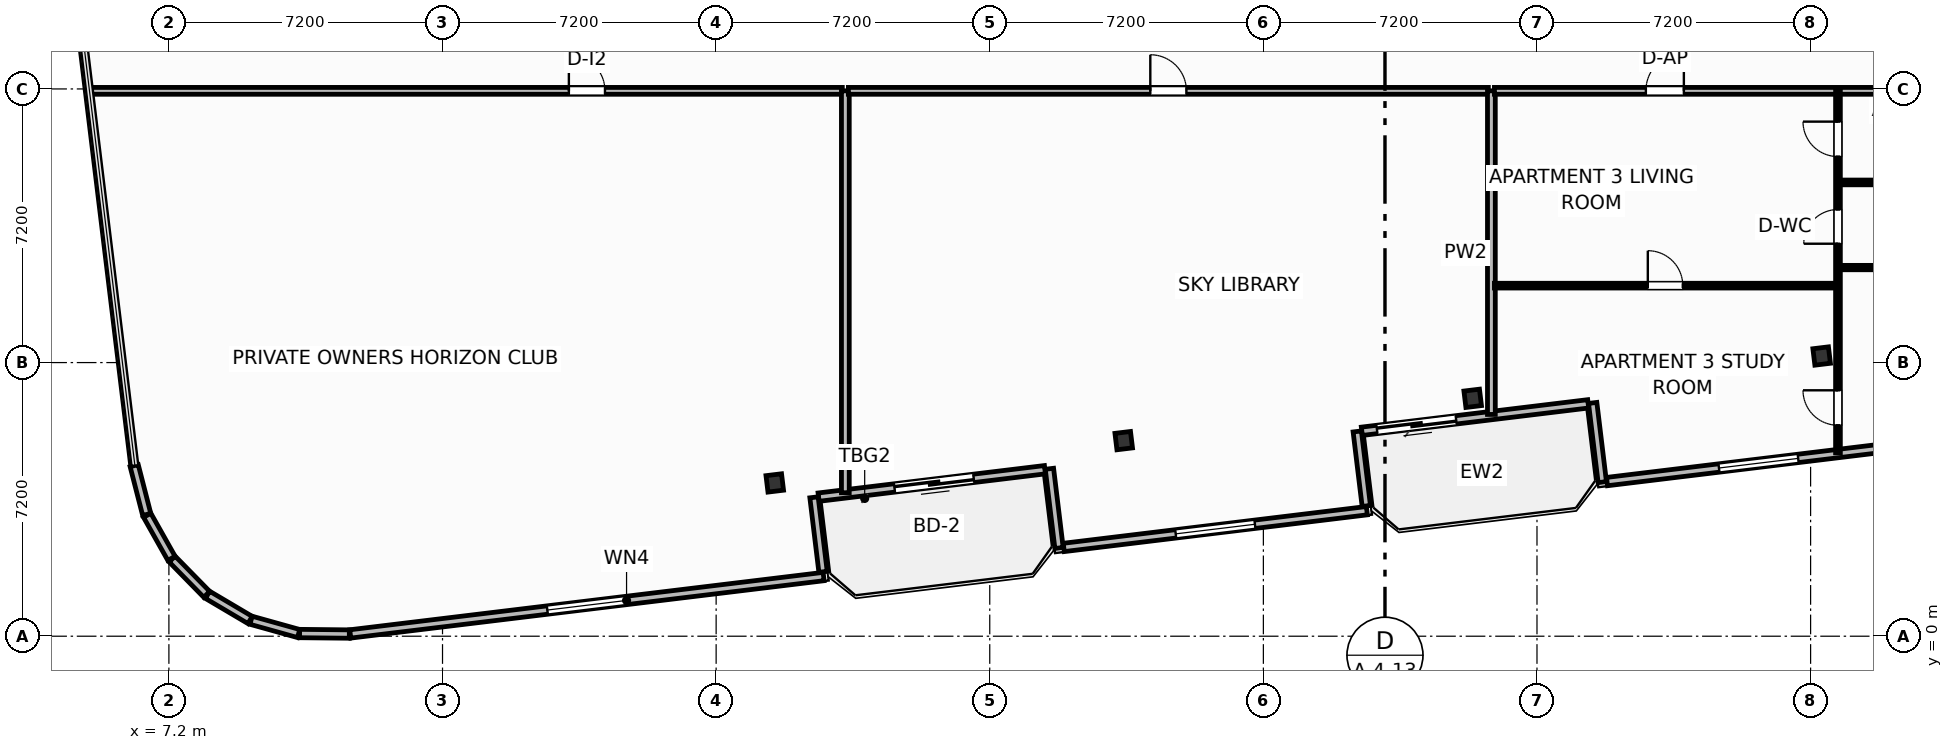
"""IFC4 building model, lengths in metres.
Left out: names, types, materials, properties, quantities, classifications, styles, units other than length and angle.
Written with IfcOpenShell. Run it as: python <this file> out.ifc"""

import sys

from ifc_helpers import new_model, si_unit, direction, frame, frame_2d, origin, origin_2d, place, context, subcontext, project, spatial, rectangle, i_section, extrude, element, fill, save


model = new_model("IFC4")
c1 = context("Model", 3, precision=1e-05, world=origin(), true_north=direction((0.0, 1.0)))
c2 = subcontext(c1, "Body", "Model", "MODEL_VIEW")
j1 = project(units=[si_unit("LENGTHUNIT", "METRE"), si_unit("PLANEANGLEUNIT", "RADIAN")], contexts=[c1])
p1 = place(None, origin())
s1 = spatial("IfcSite", under=j1, at=p1, CompositionType="ELEMENT")
p2 = place(p1, origin())
s2 = spatial("IfcBuilding", under=s1, at=p2, CompositionType="ELEMENT")
p3 = place(p2, frame((0.0, 0.0, 178.3)))
s3 = spatial("IfcBuildingStorey", under=s2, at=p3, CompositionType="ELEMENT", Elevation=178.3)
for number, where, z_axis, x_axis in (
    (1, (23.143, 4.033, 0.0), (0.0, 0.0, 1.0), (0.993, 0.12, 0.0)),
    (2, (32.325, 5.146, 0.0), (0.0, 0.0, 1.0), (0.993, 0.12, 0.0)),
    (3, (41.508, 6.26, 0.0), (0.0, 0.0, 1.0), (0.993, 0.12, 0.0)),
    (4, (50.691, 7.373, 0.0), (0.0, 0.0, 1.0), (0.993, 0.12, 0.0)),
):
    element("IfcColumn", number, at=place(p3, frame(where, z_axis=z_axis, x_axis=x_axis)), inside=s3, PredefinedType="COLUMN", context=c2, shape_type="SweptSolid", body=[
        extrude(i_section(OverallWidth=0.412, OverallDepth=0.435, WebThickness=0.036, FlangeThickness=0.057, FilletRadius=0.025, at=origin_2d()), origin(), (0.0, 0.0, 1.0), 3.7),
    ])
p4 = place(p3, frame((30.252, 4.381, 0.0), z_axis=(0.0, 0.0, 1.0), x_axis=(-0.992735402148, -0.120318000826, 0.0)))
e5 = element("IfcWall", 5, at=p4, inside=s3, PredefinedType="SOLIDWALL", context=c2, shape_type="SweptSolid", body=[
    extrude(rectangle(XDim=6.0, YDim=0.22, at=frame_2d((3.0, 0.0))), origin(), (0.0, 0.0, 1.0), 2.73),
])
p5 = place(p4, frame((1.888, 0.0, 0.0)))
e6 = element("IfcOpeningElement", 6, at=p5, cuts=e5, PredefinedType="OPENING", context=c2, shape_type="SweptSolid", body=[
    extrude(rectangle(XDim=2.1, YDim=2.3, at=frame_2d((1.05, 1.15))), frame((0.0, 0.12, 0.0), z_axis=(0.0, -1.0, 0.0), x_axis=(1.0, 0.0, 0.0)), (0.0, 0.0, 1.0), 0.24),
])
p6 = place(p3, frame((44.548, 6.114, 0.0), z_axis=(0.0, 0.0, 1.0), x_axis=(-0.992735402148, -0.120318000826, 0.0)))
e7 = element("IfcWall", 7, at=p6, inside=s3, PredefinedType="SOLIDWALL", context=c2, shape_type="SweptSolid", body=[
    extrude(rectangle(XDim=6.0, YDim=0.22, at=frame_2d((3.0, 0.0))), origin(), (0.0, 0.0, 1.0), 2.73),
])
p7 = place(p6, frame((3.5, 0.0, 0.0)))
e8 = element("IfcOpeningElement", 8, at=p7, cuts=e7, PredefinedType="OPENING", context=c2, shape_type="SweptSolid", body=[
    extrude(rectangle(XDim=2.1, YDim=2.3, at=frame_2d((1.05, 1.15))), frame((0.0, 0.12, 0.0), z_axis=(0.0, -1.0, 0.0), x_axis=(1.0, 0.0, 0.0)), (0.0, 0.0, 1.0), 0.24),
])
p8 = place(p3, frame((6.286, 4.488, 0.0), z_axis=(0.0, 0.0, 1.0), x_axis=(0.248942347653, -0.968518305219, 0.0)))
e9 = element("IfcWall", 9, at=p8, inside=s3, PredefinedType="SOLIDWALL", context=c2, shape_type="SweptSolid", body=[
    extrude(rectangle(XDim=1.326, YDim=0.22, at=frame_2d((0.663, 0.0))), origin(), (0.0, 0.0, 1.0), 2.73),
])
for number, where, z_axis, x_axis in (
    (10, (6.629, 3.182, 0.0), (0.0, 0.0, 1.0), (0.491, -0.871, 0.0)),
    (11, (7.285, 2.031, 0.0), (0.0, 0.0, 1.0), (0.7, -0.714, 0.0)),
    (12, (8.217, 1.089, 0.0), (0.0, 0.0, 1.0), (0.861, -0.509, 0.0)),
):
    element("IfcWall", number, at=place(p3, frame(where, z_axis=z_axis, x_axis=x_axis)), inside=s3, PredefinedType="SOLIDWALL", context=c2, shape_type="SweptSolid", body=[
        extrude(rectangle(XDim=1.301, YDim=0.22, at=frame_2d((0.65, 0.0))), origin(), (0.0, 0.0, 1.0), 2.73),
    ])
p9 = place(p3, frame((9.361, 0.42, 0.0), z_axis=(0.0, 0.0, 1.0), x_axis=(0.963218895288, -0.268717992997, 0.0)))
e13 = element("IfcWall", 13, at=p9, inside=s3, PredefinedType="SOLIDWALL", context=c2, shape_type="SweptSolid", body=[
    extrude(rectangle(XDim=1.301, YDim=0.22, at=frame_2d((0.65, 0.0))), origin(), (0.0, 0.0, 1.0), 2.73),
])
p10 = place(p3, frame((10.639, 0.07, 0.0), z_axis=(0.0, 0.0, 1.0), x_axis=(0.999947377741, -0.010258740119, 0.0)))
e14 = element("IfcWall", 14, at=p10, inside=s3, PredefinedType="SOLIDWALL", context=c2, shape_type="SweptSolid", body=[
    extrude(rectangle(XDim=1.309, YDim=0.22, at=frame_2d((0.654, 0.0))), origin(), (0.0, 0.0, 1.0), 2.73),
])
p11 = place(p3, frame((11.972, 0.06, 0.0), z_axis=(0.0, 0.0, 1.0), x_axis=(0.992732021049, 0.120345894751, 0.0)))
e15 = element("IfcWall", 15, at=p11, inside=s3, PredefinedType="SOLIDWALL", context=c2, shape_type="SweptSolid", body=[
    extrude(rectangle(XDim=12.547, YDim=0.22, at=frame_2d((6.274, 0.0))), origin(), (0.0, 0.0, 1.0), 2.73),
])
p12 = place(p11, frame((5.224, 0.0, 0.8)))
e16 = element("IfcOpeningElement", 16, at=p12, cuts=e15, PredefinedType="OPENING", context=c2, shape_type="SweptSolid", body=[
    extrude(rectangle(XDim=2.1, YDim=1.75, at=frame_2d((1.05, 0.875))), frame((0.0, 0.12, 0.0), z_axis=(0.0, -1.0, 0.0), x_axis=(1.0, 0.0, 0.0)), (0.0, 0.0, 1.0), 0.24),
])
p13 = place(p3, frame((24.413, 1.694, 0.0), z_axis=(0.0, 0.0, 1.0), x_axis=(-0.120290754542, 0.992738703976, 0.0)))
e17 = element("IfcWall", 17, at=p13, inside=s3, PredefinedType="SOLIDWALL", context=c2, shape_type="SweptSolid", body=[
    extrude(rectangle(XDim=1.975, YDim=0.22, at=frame_2d((0.987, 0.0))), origin(), (0.0, 0.0, 1.0), 2.73),
])
p14 = place(p3, frame((30.37, 4.406, 0.0), z_axis=(0.0, 0.0, 1.0), x_axis=(0.120327895535, -0.992734202874, 0.0)))
e18 = element("IfcWall", 18, at=p14, inside=s3, PredefinedType="SOLIDWALL", context=c2, shape_type="SweptSolid", body=[
    extrude(rectangle(XDim=2.1, YDim=0.22, at=frame_2d((1.05, 0.0))), origin(), (0.0, 0.0, 1.0), 2.73),
])
p15 = place(p3, frame((30.747, 2.336, 0.0), z_axis=(0.0, 0.0, 1.0), x_axis=(0.992731032022, 0.120354052946, 0.0)))
e19 = element("IfcWall", 19, at=p15, inside=s3, PredefinedType="SOLIDWALL", context=c2, shape_type="SweptSolid", body=[
    extrude(rectangle(XDim=8.035, YDim=0.22, at=frame_2d((4.018, 0.0))), origin(), (0.0, 0.0, 1.0), 2.73),
])
p16 = place(p15, frame((2.968, 0.0, 0.8)))
e20 = element("IfcOpeningElement", 20, at=p16, cuts=e19, PredefinedType="OPENING", context=c2, shape_type="SweptSolid", body=[
    extrude(rectangle(XDim=2.1, YDim=1.75, at=frame_2d((1.05, 0.875))), frame((0.0, 0.12, 0.0), z_axis=(0.0, -1.0, 0.0), x_axis=(1.0, 0.0, 0.0)), (0.0, 0.0, 1.0), 0.24),
])
p17 = place(p3, frame((38.709, 3.427, 0.0), z_axis=(0.0, 0.0, 1.0), x_axis=(-0.120397815541, 0.992725725472, 0.0)))
e21 = element("IfcWall", 21, at=p17, inside=s3, PredefinedType="SOLIDWALL", context=c2, shape_type="SweptSolid", body=[
    extrude(rectangle(XDim=1.975, YDim=0.22, at=frame_2d((0.988, 0.0))), origin(), (0.0, 0.0, 1.0), 2.73),
])
p18 = place(p3, frame((44.666, 6.138, 0.0), z_axis=(0.0, 0.0, 1.0), x_axis=(0.120327895535, -0.992734202874, 0.0)))
e22 = element("IfcWall", 22, at=p18, inside=s3, PredefinedType="SOLIDWALL", context=c2, shape_type="SweptSolid", body=[
    extrude(rectangle(XDim=2.1, YDim=0.22, at=frame_2d((1.05, 0.0))), origin(), (0.0, 0.0, 1.0), 2.73),
])
p19 = place(p3, frame((45.042, 4.069, 0.0), z_axis=(0.0, 0.0, 1.0), x_axis=(0.992731032022, 0.120354052946, 0.0)))
e23 = element("IfcWall", 23, at=p19, inside=s3, PredefinedType="SOLIDWALL", context=c2, shape_type="SweptSolid", body=[
    extrude(rectangle(XDim=8.035, YDim=0.22, at=frame_2d((4.018, 0.0))), origin(), (0.0, 0.0, 1.0), 2.73),
])
p20 = place(p19, frame((2.968, 0.0, 0.8)))
e24 = element("IfcOpeningElement", 24, at=p20, cuts=e23, PredefinedType="OPENING", context=c2, shape_type="SweptSolid", body=[
    extrude(rectangle(XDim=2.1, YDim=1.75, at=frame_2d((1.05, 0.875))), frame((0.0, 0.12, 0.0), z_axis=(0.0, -1.0, 0.0), x_axis=(1.0, 0.0, 0.0)), (0.0, 0.0, 1.0), 0.24),
])
p21 = place(p3, frame((5.15, 14.35, 0.0), z_axis=(0.0, 0.0, 1.0), x_axis=(1.0, 0.0, 0.0)))
e25 = element("IfcWall", 25, at=p21, inside=s3, PredefinedType="PARTITIONING", context=c2, shape_type="SweptSolid", body=[
    extrude(rectangle(XDim=19.77, YDim=0.18, at=frame_2d((9.885, 0.0))), origin(), (0.0, 0.0, 1.0), 3.45),
])
p22 = place(p21, frame((12.575, 0.0, 0.0)))
e26 = element("IfcOpeningElement", 26, at=p22, cuts=e25, PredefinedType="OPENING", context=c2, shape_type="SweptSolid", body=[
    extrude(rectangle(XDim=0.95, YDim=2.05, at=frame_2d((0.475, 1.025))), frame((0.0, 0.1, 0.0), z_axis=(0.0, -1.0, 0.0), x_axis=(1.0, 0.0, 0.0)), (0.0, 0.0, 1.0), 0.2),
])
p23 = place(p3, frame((25.0, 3.775, 0.0), z_axis=(0.0, 0.0, 1.0), x_axis=(0.0, 1.0, 0.0)))
e27 = element("IfcWall", 27, at=p23, inside=s3, PredefinedType="PARTITIONING", context=c2, shape_type="SweptSolid", body=[
    extrude(rectangle(XDim=10.575, YDim=0.205, at=frame_2d((5.288, 0.0))), origin(), (0.0, 0.0, 1.0), 3.45),
])
p24 = place(p3, frame((25.08, 14.35, 0.0), z_axis=(0.0, 0.0, 1.0), x_axis=(1.0, 0.0, 0.0)))
e28 = element("IfcWall", 28, at=p24, inside=s3, PredefinedType="PARTITIONING", context=c2, shape_type="SweptSolid", body=[
    extrude(rectangle(XDim=16.84, YDim=0.18, at=frame_2d((8.42, 0.0))), origin(), (0.0, 0.0, 1.0), 3.45),
])
p25 = place(p24, frame((7.945, 0.0, 0.0)))
e29 = element("IfcOpeningElement", 29, at=p25, cuts=e28, PredefinedType="OPENING", context=c2, shape_type="SweptSolid", body=[
    extrude(rectangle(XDim=0.95, YDim=2.05, at=frame_2d((0.475, 1.025))), frame((0.0, 0.1, 0.0), z_axis=(0.0, -1.0, 0.0), x_axis=(1.0, 0.0, 0.0)), (0.0, 0.0, 1.0), 0.2),
])
p26 = place(p3, frame((42.0, 5.835, 0.0), z_axis=(0.0, 0.0, 1.0), x_axis=(0.0, 1.0, 0.0)))
e30 = element("IfcWall", 30, at=p26, inside=s3, PredefinedType="PARTITIONING", context=c2, shape_type="SweptSolid", body=[
    extrude(rectangle(XDim=8.515, YDim=0.205, at=frame_2d((4.257, 0.0))), origin(), (0.0, 0.0, 1.0), 2.662),
])
p27 = place(p3, frame((42.08, 9.224, 0.0), z_axis=(0.0, 0.0, 1.0), x_axis=(1.0, 0.0, 0.0)))
e31 = element("IfcWall", 31, at=p27, inside=s3, PredefinedType="PARTITIONING", context=c2, shape_type="SweptSolid", body=[
    extrude(rectangle(XDim=8.97, YDim=0.125, at=frame_2d((4.485, 0.0))), origin(), (0.0, 0.0, 1.0), 3.45),
])
p28 = place(p27, frame((4.037, 0.0, 0.0)))
e32 = element("IfcOpeningElement", 32, at=p28, cuts=e31, PredefinedType="OPENING", context=c2, shape_type="SweptSolid", body=[
    extrude(rectangle(XDim=0.92, YDim=2.05, at=frame_2d((0.46, 1.025))), frame((0.0, 0.073, 0.0), z_axis=(0.0, -1.0, 0.0), x_axis=(1.0, 0.0, 0.0)), (0.0, 0.0, 1.0), 0.145),
])
p29 = place(p3, frame((42.08, 14.35, 0.0), z_axis=(0.0, 0.0, 1.0), x_axis=(1.0, 0.0, 0.0)))
e33 = element("IfcWall", 33, at=p29, inside=s3, PredefinedType="PARTITIONING", context=c2, shape_type="SweptSolid", body=[
    extrude(rectangle(XDim=13.84, YDim=0.18, at=frame_2d((6.92, 0.0))), origin(), (0.0, 0.0, 1.0), 3.45),
])
p30 = place(p29, frame((3.985, 0.0, 0.0)))
e34 = element("IfcOpeningElement", 34, at=p30, cuts=e33, PredefinedType="OPENING", context=c2, shape_type="SweptSolid", body=[
    extrude(rectangle(XDim=1.0, YDim=2.2, at=frame_2d((0.5, 1.1))), frame((0.0, 0.1, 0.0), z_axis=(0.0, -1.0, 0.0), x_axis=(1.0, 0.0, 0.0)), (0.0, 0.0, 1.0), 0.2),
])
p31 = place(p3, frame((51.12, 4.826, 0.0), z_axis=(0.0, 0.0, 1.0), x_axis=(0.0, 1.0, 0.0)))
e35 = element("IfcWall", 35, at=p31, inside=s3, PredefinedType="PARTITIONING", context=c2, shape_type="SweptSolid", body=[
    extrude(rectangle(XDim=9.524, YDim=0.125, at=frame_2d((4.762, 0.0))), origin(), (0.0, 0.0, 1.0), 2.662),
])
p32 = place(p31, frame((0.725, 0.0, 0.0)))
e36 = element("IfcOpeningElement", 36, at=p32, cuts=e35, PredefinedType="OPENING", context=c2, shape_type="SweptSolid", body=[
    extrude(rectangle(XDim=0.92, YDim=2.05, at=frame_2d((0.46, 1.025))), frame((0.0, 0.073, 0.0), z_axis=(0.0, -1.0, 0.0), x_axis=(1.0, 0.0, 0.0)), (0.0, 0.0, 1.0), 0.145),
])
p33 = place(p31, frame((5.502, 0.0, 0.0)))
e37 = element("IfcOpeningElement", 37, at=p33, cuts=e35, PredefinedType="OPENING", context=c2, shape_type="SweptSolid", body=[
    extrude(rectangle(XDim=0.9, YDim=2.05, at=frame_2d((0.45, 1.025))), frame((0.0, 0.073, 0.0), z_axis=(0.0, -1.0, 0.0), x_axis=(1.0, 0.0, 0.0)), (0.0, 0.0, 1.0), 0.145),
])
p34 = place(p31, frame((7.794, 0.0, 0.0)))
e38 = element("IfcOpeningElement", 38, at=p34, cuts=e35, PredefinedType="OPENING", context=c2, shape_type="SweptSolid", body=[
    extrude(rectangle(XDim=0.92, YDim=2.05, at=frame_2d((0.46, 1.025))), frame((0.0, 0.073, 0.0), z_axis=(0.0, -1.0, 0.0), x_axis=(1.0, 0.0, 0.0)), (0.0, 0.0, 1.0), 0.145),
])
p35 = place(p3, frame((51.19, 11.94, 0.0), z_axis=(0.0, 0.0, 1.0), x_axis=(1.0, 0.0, 0.0)))
e39 = element("IfcWall", 39, at=p35, inside=s3, PredefinedType="PARTITIONING", context=c2, shape_type="SweptSolid", body=[
    extrude(rectangle(XDim=4.73, YDim=0.125, at=frame_2d((2.365, 0.0))), origin(), (0.0, 0.0, 1.0), 3.018),
])
p36 = place(p3, frame((51.19, 9.7, 0.0), z_axis=(0.0, 0.0, 1.0), x_axis=(1.0, 0.0, 0.0)))
e40 = element("IfcWall", 40, at=p36, inside=s3, PredefinedType="PARTITIONING", context=c2, shape_type="SweptSolid", body=[
    extrude(rectangle(XDim=4.73, YDim=0.115, at=frame_2d((2.365, 0.0))), origin(), (0.0, 0.0, 1.0), 3.45),
])
p37 = place(p5, origin())
e41 = element("IfcDoor", 41, at=p37, inside=s3, OperationType="SLIDING_TO_LEFT", PredefinedType="DOOR", context=c2, shape_type="SweptSolid", body=[
    extrude(rectangle(XDim=2.1, YDim=2.3, at=frame_2d((1.05, 1.15))), frame((0.0, 0.025, 0.0), z_axis=(0.0, -1.0, 0.0), x_axis=(1.0, 0.0, 0.0)), (0.0, 0.0, 1.0), 0.05),
])
fill(e6, e41)
p38 = place(p7, origin())
e42 = element("IfcDoor", 42, at=p38, inside=s3, OperationType="SLIDING_TO_LEFT", PredefinedType="DOOR", context=c2, shape_type="SweptSolid", body=[
    extrude(rectangle(XDim=2.1, YDim=2.3, at=frame_2d((1.05, 1.15))), frame((0.0, 0.025, 0.0), z_axis=(0.0, -1.0, 0.0), x_axis=(1.0, 0.0, 0.0)), (0.0, 0.0, 1.0), 0.05),
])
fill(e8, e42)
p39 = place(p12, origin())
e43 = element("IfcWindow", 43, at=p39, inside=s3, PartitioningType="SINGLE_PANEL", PredefinedType="WINDOW", context=c2, shape_type="SweptSolid", body=[
    extrude(rectangle(XDim=2.1, YDim=1.75, at=frame_2d((1.05, 0.875))), frame((0.0, 0.03, 0.0), z_axis=(0.0, -1.0, 0.0), x_axis=(1.0, 0.0, 0.0)), (0.0, 0.0, 1.0), 0.06),
])
fill(e16, e43)
p40 = place(p16, origin())
e44 = element("IfcWindow", 44, at=p40, inside=s3, PartitioningType="SINGLE_PANEL", PredefinedType="WINDOW", context=c2, shape_type="SweptSolid", body=[
    extrude(rectangle(XDim=2.1, YDim=1.75, at=frame_2d((1.05, 0.875))), frame((0.0, 0.03, 0.0), z_axis=(0.0, -1.0, 0.0), x_axis=(1.0, 0.0, 0.0)), (0.0, 0.0, 1.0), 0.06),
])
fill(e20, e44)
p41 = place(p20, origin())
e45 = element("IfcWindow", 45, at=p41, inside=s3, PartitioningType="SINGLE_PANEL", PredefinedType="WINDOW", context=c2, shape_type="SweptSolid", body=[
    extrude(rectangle(XDim=2.1, YDim=1.75, at=frame_2d((1.05, 0.875))), frame((0.0, 0.03, 0.0), z_axis=(0.0, -1.0, 0.0), x_axis=(1.0, 0.0, 0.0)), (0.0, 0.0, 1.0), 0.06),
])
fill(e24, e45)
p42 = place(p22, origin())
e46 = element("IfcDoor", 46, at=p42, inside=s3, OperationType="SINGLE_SWING_LEFT", PredefinedType="DOOR", context=c2, shape_type="SweptSolid", body=[
    extrude(rectangle(XDim=0.95, YDim=2.05, at=frame_2d((0.475, 1.025))), frame((0.0, 0.025, 0.0), z_axis=(0.0, -1.0, 0.0), x_axis=(1.0, 0.0, 0.0)), (0.0, 0.0, 1.0), 0.05),
])
fill(e26, e46)
p43 = place(p25, origin())
e47 = element("IfcDoor", 47, at=p43, inside=s3, OperationType="SINGLE_SWING_LEFT", PredefinedType="DOOR", context=c2, shape_type="SweptSolid", body=[
    extrude(rectangle(XDim=0.95, YDim=2.05, at=frame_2d((0.475, 1.025))), frame((0.0, 0.025, 0.0), z_axis=(0.0, -1.0, 0.0), x_axis=(1.0, 0.0, 0.0)), (0.0, 0.0, 1.0), 0.05),
])
fill(e29, e47)
p44 = place(p28, origin())
e48 = element("IfcDoor", 48, at=p44, inside=s3, OperationType="SINGLE_SWING_LEFT", PredefinedType="DOOR", context=c2, shape_type="SweptSolid", body=[
    extrude(rectangle(XDim=0.92, YDim=2.05, at=frame_2d((0.46, 1.025))), frame((0.0, 0.025, 0.0), z_axis=(0.0, -1.0, 0.0), x_axis=(1.0, 0.0, 0.0)), (0.0, 0.0, 1.0), 0.05),
])
fill(e32, e48)
p45 = place(p30, origin())
e49 = element("IfcDoor", 49, at=p45, inside=s3, OperationType="SINGLE_SWING_RIGHT", PredefinedType="DOOR", context=c2, shape_type="SweptSolid", body=[
    extrude(rectangle(XDim=1.0, YDim=2.2, at=frame_2d((0.5, 1.1))), frame((0.0, 0.025, 0.0), z_axis=(0.0, -1.0, 0.0), x_axis=(1.0, 0.0, 0.0)), (0.0, 0.0, 1.0), 0.05),
])
fill(e34, e49)
p46 = place(p32, origin())
e50 = element("IfcDoor", 50, at=p46, inside=s3, OperationType="SINGLE_SWING_RIGHT", PredefinedType="DOOR", context=c2, shape_type="SweptSolid", body=[
    extrude(rectangle(XDim=0.92, YDim=2.05, at=frame_2d((0.46, 1.025))), frame((0.0, 0.025, 0.0), z_axis=(0.0, -1.0, 0.0), x_axis=(1.0, 0.0, 0.0)), (0.0, 0.0, 1.0), 0.05),
])
fill(e36, e50)
p47 = place(p33, origin())
e51 = element("IfcDoor", 51, at=p47, inside=s3, OperationType="SINGLE_SWING_LEFT", PredefinedType="DOOR", context=c2, shape_type="SweptSolid", body=[
    extrude(rectangle(XDim=0.9, YDim=2.05, at=frame_2d((0.45, 1.025))), frame((0.0, 0.025, 0.0), z_axis=(0.0, -1.0, 0.0), x_axis=(1.0, 0.0, 0.0)), (0.0, 0.0, 1.0), 0.05),
])
fill(e37, e51)
p48 = place(p34, origin())
e52 = element("IfcDoor", 52, at=p48, inside=s3, OperationType="SINGLE_SWING_RIGHT", PredefinedType="DOOR", context=c2, shape_type="SweptSolid", body=[
    extrude(rectangle(XDim=0.92, YDim=2.05, at=frame_2d((0.46, 1.025))), frame((0.0, 0.025, 0.0), z_axis=(0.0, -1.0, 0.0), x_axis=(1.0, 0.0, 0.0)), (0.0, 0.0, 1.0), 0.05),
])
fill(e38, e52)
save(model, sys.argv[1])
